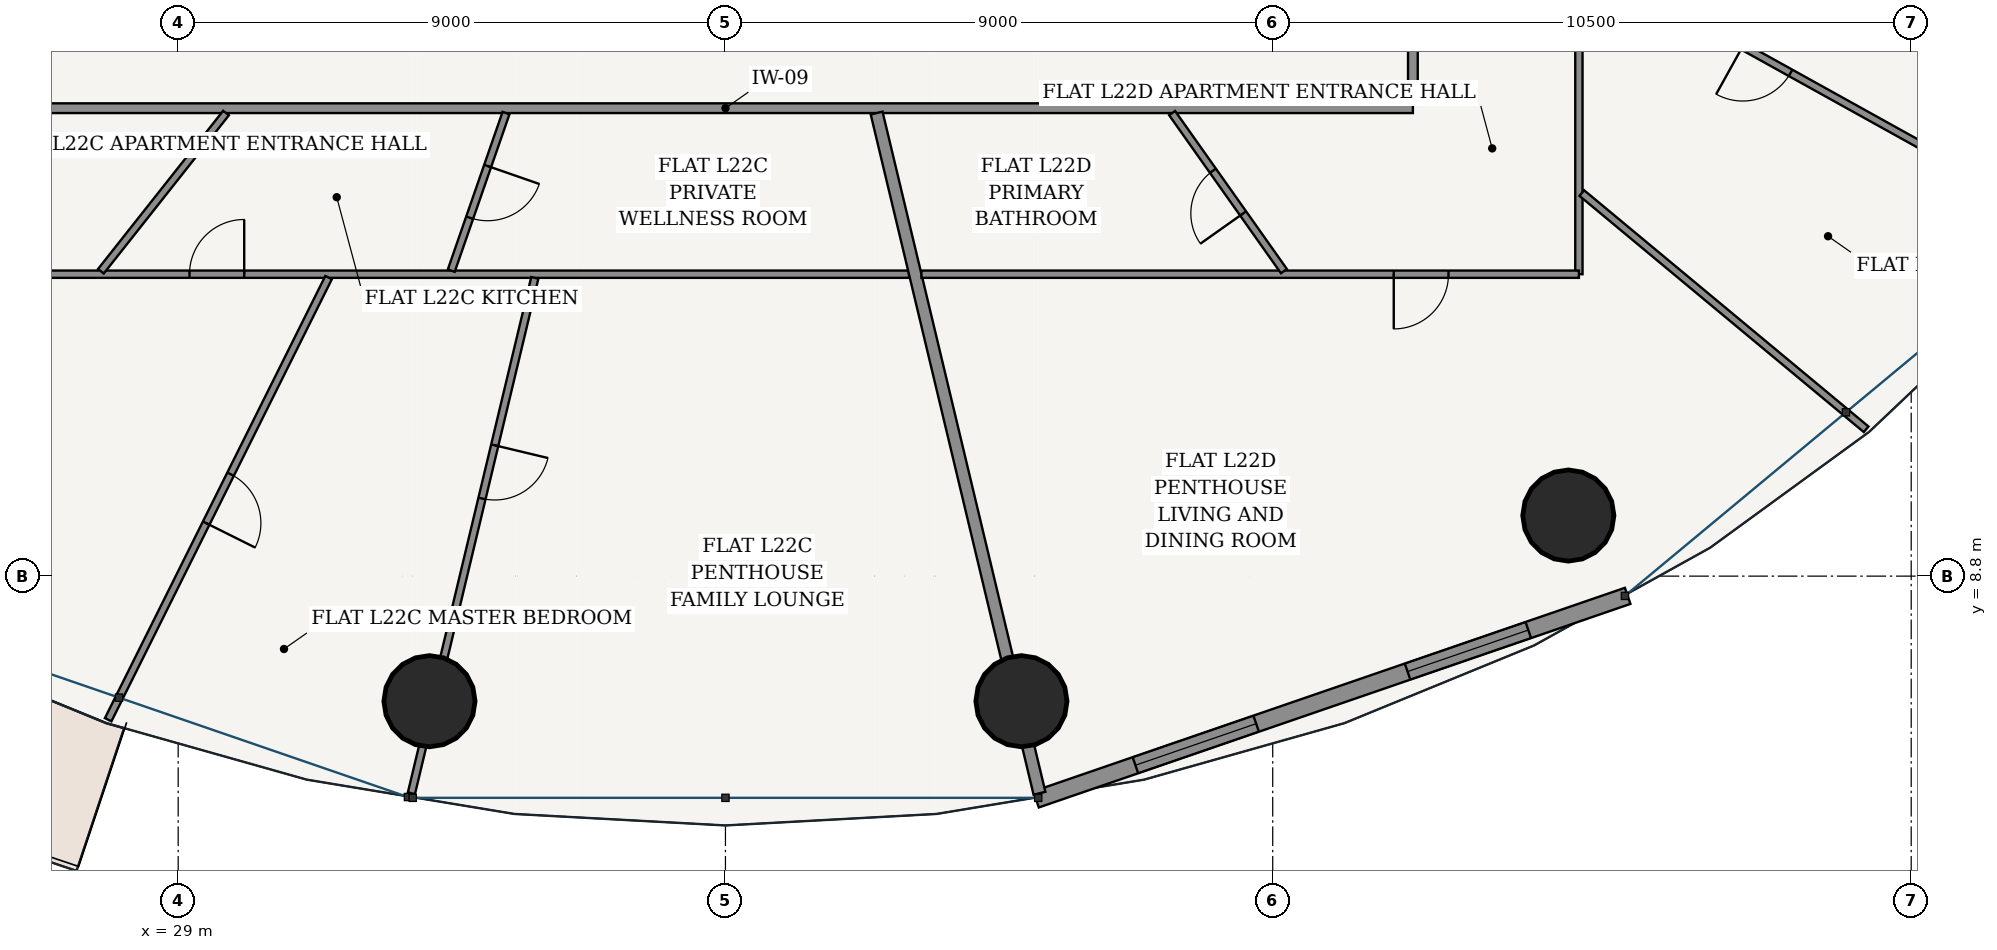
"""IFC4 building model, lengths in metres.
Left out: names, types, materials, properties, quantities, classifications, styles, units other than length and angle.
Written with IfcOpenShell. Run it as: python <this file> out.ifc"""

import sys

from ifc_helpers import new_model, si_unit, direction, frame, frame_2d, origin, origin_2d, place, context, subcontext, project, spatial, rectangle, hollow_circle, extrude, source, transform, mapped, element, fill, save


model = new_model("IFC4")
c1 = context("Model", 3, precision=1e-05, world=origin(), true_north=direction((-0.2419218956, 0.970295726276)))
c2 = subcontext(c1, "Body", "Model", "MODEL_VIEW")
j1 = project(units=[si_unit("LENGTHUNIT", "METRE"), si_unit("PLANEANGLEUNIT", "RADIAN")], contexts=[c1])
p1 = place(None, origin())
s1 = spatial("IfcSite", under=j1, at=p1, CompositionType="ELEMENT")
p2 = place(p1, origin())
s2 = spatial("IfcBuilding", under=s1, at=p2, CompositionType="ELEMENT")
p3 = place(p2, frame((0.0, 0.0, 87.0)))
s3 = spatial("IfcBuildingStorey", under=s2, at=p3, CompositionType="ELEMENT", Elevation=87.0)
for number, where, z_axis, x_axis in (
    (1, (33.133, 6.743, 0.0), (0.0, 0.0, 1.0), (1.0, 0.0, 0.0)),
    (2, (42.867, 6.743, 0.0), (0.0, 0.0, 1.0), (1.0, 0.0, 0.0)),
    (3, (51.862, 9.796, 0.0), (0.0, 0.0, 1.0), (1.0, 0.0, 0.0)),
):
    element("IfcColumn", number, at=place(p3, frame(where, z_axis=z_axis, x_axis=x_axis)), inside=s3, PredefinedType="COLUMN", context=c2, shape_type="SweptSolid", body=[
        extrude(hollow_circle(Radius=0.75, WallThickness=0.045, at=origin_2d()), origin(), (0.0, 0.0, 1.0), 3.6),
    ])
p4 = place(p3, frame((43.108, 5.128, 0.0), z_axis=(0.0, 0.0, 1.0), x_axis=(0.945590132341, 0.325360264351, 0.0)))
e4 = element("IfcWall", 4, at=p4, inside=s3, PredefinedType="SOLIDWALL", context=c2, shape_type="SweptSolid", body=[
    extrude(rectangle(XDim=10.289, YDim=0.28, at=frame_2d((5.145, 0.0))), origin(), (0.0, 0.0, 1.0), 3.325),
])
p5 = place(p4, frame((1.728, 0.0, 0.85)))
e5 = element("IfcOpeningElement", 5, at=p5, cuts=e4, PredefinedType="OPENING", context=c2, shape_type="SweptSolid", body=[
    extrude(rectangle(XDim=2.1, YDim=1.95, at=frame_2d((1.05, 0.975))), frame((0.0, 0.15, 0.0), z_axis=(0.0, -1.0, 0.0), x_axis=(1.0, 0.0, 0.0)), (0.0, 0.0, 1.0), 0.3),
])
p6 = place(p4, frame((6.461, 0.0, 0.85)))
e6 = element("IfcOpeningElement", 6, at=p6, cuts=e4, PredefinedType="OPENING", context=c2, shape_type="SweptSolid", body=[
    extrude(rectangle(XDim=2.1, YDim=1.95, at=frame_2d((1.05, 0.975))), frame((0.0, 0.15, 0.0), z_axis=(0.0, -1.0, 0.0), x_axis=(1.0, 0.0, 0.0)), (0.0, 0.0, 1.0), 0.3),
])
p7 = place(p3, frame((26.695, 16.495, 0.0), z_axis=(0.0, 0.0, 1.0), x_axis=(1.0, 0.0, 0.0)))
e7 = element("IfcWall", 7, at=p7, inside=s3, PredefinedType="PARTITIONING", context=c2, shape_type="SweptSolid", body=[
    extrude(rectangle(XDim=22.61, YDim=0.16, at=frame_2d((11.305, 0.0))), origin(), (0.0, 0.0, 1.0), 2.767),
])
p8 = place(p3, frame((49.305, 16.575, 0.0), z_axis=(0.0, 0.0, 1.0), x_axis=(0.0, 1.0, 0.0)))
e8 = element("IfcWall", 8, at=p8, inside=s3, PredefinedType="PARTITIONING", context=c2, shape_type="SweptSolid", body=[
    extrude(rectangle(XDim=20.45, YDim=0.16, at=frame_2d((10.225, 0.0))), origin(), (0.0, 0.0, 1.0), 2.767),
])
p9 = place(p8, frame((1.649, 0.0, 0.0)))
e9 = element("IfcOpeningElement", 9, at=p9, cuts=e8, PredefinedType="OPENING", context=c2, shape_type="SweptSolid", body=[
    extrude(rectangle(XDim=0.98, YDim=2.2, at=frame_2d((0.49, 1.1))), frame((0.0, 0.09, 0.0), z_axis=(0.0, -1.0, 0.0), x_axis=(1.0, 0.0, 0.0)), (0.0, 0.0, 1.0), 0.18),
])
p10 = place(p3, frame((41.019, 13.765, 0.0), z_axis=(0.0, 0.0, 1.0), x_axis=(-1.0, 0.0, 0.0)))
e10 = element("IfcWall", 10, at=p10, inside=s3, PredefinedType="PARTITIONING", context=c2, shape_type="SweptSolid", body=[
    extrude(rectangle(XDim=17.054, YDim=0.12, at=frame_2d((8.527, 0.0))), origin(), (0.0, 0.0, 1.0), 2.767),
])
p11 = place(p10, frame((10.933, 0.0, 0.0)))
e11 = element("IfcOpeningElement", 11, at=p11, cuts=e10, PredefinedType="OPENING", context=c2, shape_type="SweptSolid", body=[
    extrude(rectangle(XDim=0.9, YDim=2.15, at=frame_2d((0.45, 1.075))), frame((0.0, 0.07, 0.0), z_axis=(0.0, -1.0, 0.0), x_axis=(1.0, 0.0, 0.0)), (0.0, 0.0, 1.0), 0.14),
])
p12 = place(p3, frame((31.474, 13.709, 0.0), z_axis=(0.0, 0.0, 1.0), x_axis=(-0.446179583353, -0.894943450392, 0.0)))
e12 = element("IfcWall", 12, at=p12, inside=s3, PredefinedType="PARTITIONING", context=c2, shape_type="SweptSolid", body=[
    extrude(rectangle(XDim=8.125, YDim=0.12, at=frame_2d((4.062, 0.0))), origin(), (0.0, 0.0, 1.0), 2.767),
])
p13 = place(p12, frame((3.612, 0.0, 0.0)))
e13 = element("IfcOpeningElement", 13, at=p13, cuts=e12, PredefinedType="OPENING", context=c2, shape_type="SweptSolid", body=[
    extrude(rectangle(XDim=0.9, YDim=2.15, at=frame_2d((0.45, 1.075))), frame((0.0, 0.07, 0.0), z_axis=(0.0, -1.0, 0.0), x_axis=(1.0, 0.0, 0.0)), (0.0, 0.0, 1.0), 0.14),
])
p14 = place(p3, frame((34.865, 13.705, 0.0), z_axis=(0.0, 0.0, 1.0), x_axis=(-0.23282725047, -0.97251810854, 0.0)))
e14 = element("IfcWall", 14, at=p14, inside=s3, PredefinedType="PARTITIONING", context=c2, shape_type="SweptSolid", body=[
    extrude(rectangle(XDim=8.715, YDim=0.12, at=frame_2d((4.357, 0.0))), origin(), (0.0, 0.0, 1.0), 2.767),
])
p15 = place(p14, frame((2.831, 0.0, 0.0)))
e15 = element("IfcOpeningElement", 15, at=p15, cuts=e14, PredefinedType="OPENING", context=c2, shape_type="SweptSolid", body=[
    extrude(rectangle(XDim=0.9, YDim=2.15, at=frame_2d((0.45, 1.075))), frame((0.0, 0.07, 0.0), z_axis=(0.0, -1.0, 0.0), x_axis=(1.0, 0.0, 0.0)), (0.0, 0.0, 1.0), 0.14),
])
p16 = place(p3, frame((29.787, 16.415, 0.0), z_axis=(0.0, 0.0, 1.0), x_axis=(-0.62033143471, -0.784339793145, 0.0)))
e16 = element("IfcWall", 16, at=p16, inside=s3, PredefinedType="PARTITIONING", context=c2, shape_type="SweptSolid", body=[
    extrude(rectangle(XDim=3.317, YDim=0.12, at=frame_2d((1.658, 0.0))), origin(), (0.0, 0.0, 1.0), 3.004),
])
p17 = place(p3, frame((34.392, 16.415, 0.0), z_axis=(0.0, 0.0, 1.0), x_axis=(-0.328268661855, -0.94458439837, 0.0)))
e17 = element("IfcWall", 17, at=p17, inside=s3, PredefinedType="PARTITIONING", context=c2, shape_type="SweptSolid", body=[
    extrude(rectangle(XDim=2.744, YDim=0.12, at=frame_2d((1.372, 0.0))), origin(), (0.0, 0.0, 1.0), 3.325),
])
p18 = place(p17, frame((0.922, 0.0, 0.0)))
e18 = element("IfcOpeningElement", 18, at=p18, cuts=e17, PredefinedType="OPENING", context=c2, shape_type="SweptSolid", body=[
    extrude(rectangle(XDim=0.9, YDim=2.15, at=frame_2d((0.45, 1.075))), frame((0.0, 0.07, 0.0), z_axis=(0.0, -1.0, 0.0), x_axis=(1.0, 0.0, 0.0)), (0.0, 0.0, 1.0), 0.14),
])
p19 = place(p3, frame((40.486, 16.415, 0.0), z_axis=(0.0, 0.0, 1.0), x_axis=(0.232829417917, -0.972517589636, 0.0)))
e19 = element("IfcWall", 19, at=p19, inside=s3, PredefinedType="PARTITIONING", context=c2, shape_type="SweptSolid", body=[
    extrude(rectangle(XDim=11.502, YDim=0.2, at=frame_2d((5.751, 0.0))), origin(), (0.0, 0.0, 1.0), 2.767),
])
p20 = place(p3, frame((52.035, 29.017, 0.0), z_axis=(0.0, 0.0, 1.0), x_axis=(0.0, -1.0, 0.0)))
e20 = element("IfcWall", 20, at=p20, inside=s3, PredefinedType="PARTITIONING", context=c2, shape_type="SweptSolid", body=[
    extrude(rectangle(XDim=15.252, YDim=0.12, at=frame_2d((7.626, 0.0))), origin(), (0.0, 0.0, 1.0), 2.767),
])
p21 = place(p20, frame((7.278, 0.0, 0.0)))
e21 = element("IfcOpeningElement", 21, at=p21, cuts=e20, PredefinedType="OPENING", context=c2, shape_type="SweptSolid", body=[
    extrude(rectangle(XDim=0.9, YDim=2.15, at=frame_2d((0.45, 1.075))), frame((0.0, 0.07, 0.0), z_axis=(0.0, -1.0, 0.0), x_axis=(1.0, 0.0, 0.0)), (0.0, 0.0, 1.0), 0.14),
])
p22 = place(p3, frame((52.035, 13.765, 0.0), z_axis=(0.0, 0.0, 1.0), x_axis=(-1.0, 0.0, 0.0)))
e22 = element("IfcWall", 22, at=p22, inside=s3, PredefinedType="PARTITIONING", context=c2, shape_type="SweptSolid", body=[
    extrude(rectangle(XDim=10.812, YDim=0.12, at=frame_2d((5.406, 0.0))), origin(), (0.0, 0.0, 1.0), 2.767),
])
p23 = place(p22, frame((2.145, 0.0, 0.0)))
e23 = element("IfcOpeningElement", 23, at=p23, cuts=e22, PredefinedType="OPENING", context=c2, shape_type="SweptSolid", body=[
    extrude(rectangle(XDim=0.9, YDim=2.15, at=frame_2d((0.45, 1.075))), frame((0.0, 0.07, 0.0), z_axis=(0.0, -1.0, 0.0), x_axis=(1.0, 0.0, 0.0)), (0.0, 0.0, 1.0), 0.14),
])
p24 = place(p3, frame((52.083, 15.1, 0.0), z_axis=(0.0, 0.0, 1.0), x_axis=(0.769161827891, -0.63905405289, 0.0)))
e24 = element("IfcWall", 24, at=p24, inside=s3, PredefinedType="PARTITIONING", context=c2, shape_type="SweptSolid", body=[
    extrude(rectangle(XDim=6.08, YDim=0.12, at=frame_2d((3.04, 0.0))), origin(), (0.0, 0.0, 1.0), 2.767),
])
p25 = place(p3, frame((52.089, 18.979, 0.0), z_axis=(0.0, 0.0, 1.0), x_axis=(0.874313476423, -0.485361664066, 0.0)))
e25 = element("IfcWall", 25, at=p25, inside=s3, PredefinedType="PARTITIONING", context=c2, shape_type="SweptSolid", body=[
    extrude(rectangle(XDim=9.066, YDim=0.12, at=frame_2d((4.533, 0.0))), origin(), (0.0, 0.0, 1.0), 2.767),
])
p26 = place(p25, frame((3.02, 0.0, 0.0)))
e26 = element("IfcOpeningElement", 26, at=p26, cuts=e25, PredefinedType="OPENING", context=c2, shape_type="SweptSolid", body=[
    extrude(rectangle(XDim=0.9, YDim=2.15, at=frame_2d((0.45, 1.075))), frame((0.0, 0.07, 0.0), z_axis=(0.0, -1.0, 0.0), x_axis=(1.0, 0.0, 0.0)), (0.0, 0.0, 1.0), 0.14),
])
p27 = place(p3, frame((45.345, 16.415, 0.0), z_axis=(0.0, 0.0, 1.0), x_axis=(0.577474693199, -0.816408585645, 0.0)))
e27 = element("IfcWall", 27, at=p27, inside=s3, PredefinedType="PARTITIONING", context=c2, shape_type="SweptSolid", body=[
    extrude(rectangle(XDim=3.184, YDim=0.12, at=frame_2d((1.592, 0.0))), origin(), (0.0, 0.0, 1.0), 3.004),
])
p28 = place(p27, frame((1.162, 0.0, 0.0)))
e28 = element("IfcOpeningElement", 28, at=p28, cuts=e27, PredefinedType="OPENING", context=c2, shape_type="SweptSolid", body=[
    extrude(rectangle(XDim=0.86, YDim=2.15, at=frame_2d((0.43, 1.075))), frame((0.0, 0.07, 0.0), z_axis=(0.0, -1.0, 0.0), x_axis=(1.0, 0.0, 0.0)), (0.0, 0.0, 1.0), 0.14),
])
m1 = source(origin(), c2, "Body", "SweptSolid", [
    extrude(rectangle(XDim=2.1, YDim=1.95, at=frame_2d((1.05, 0.975))), frame((0.0, 0.03, 0.0), z_axis=(0.0, -1.0, 0.0), x_axis=(1.0, 0.0, 0.0)), (0.0, 0.0, 1.0), 0.06),
])
p29 = place(p5, origin())
e29 = element("IfcWindow", 29, at=p29, inside=s3, PartitioningType="SINGLE_PANEL", PredefinedType="WINDOW", context=c2, shape_type="MappedRepresentation", body=[
    mapped(m1, transform((0.0, 0.0, 0.0), scale=1.0)),
])
fill(e5, e29)
p30 = place(p6, origin())
e30 = element("IfcWindow", 30, at=p30, inside=s3, PartitioningType="SINGLE_PANEL", PredefinedType="WINDOW", context=c2, shape_type="MappedRepresentation", body=[
    mapped(m1, transform((0.0, 0.0, 0.0), scale=1.0)),
])
fill(e6, e30)
m2 = source(origin(), c2, "Body", "SweptSolid", [
    extrude(rectangle(XDim=0.9, YDim=2.15, at=frame_2d((0.45, 1.075))), frame((0.0, 0.025, 0.0), z_axis=(0.0, -1.0, 0.0), x_axis=(1.0, 0.0, 0.0)), (0.0, 0.0, 1.0), 0.05),
])
p31 = place(p11, frame((0.9, 0.0, 0.0), z_axis=(0.0, 0.0, 1.0), x_axis=(-1.0, 0.0, 0.0)))
e31 = element("IfcDoor", 31, at=p31, inside=s3, OperationType="SINGLE_SWING_RIGHT", PredefinedType="DOOR", context=c2, shape_type="MappedRepresentation", body=[
    mapped(m2, transform((0.0, 0.0, 0.0), scale=1.0)),
])
fill(e11, e31)
p32 = place(p18, origin())
e32 = element("IfcDoor", 32, at=p32, inside=s3, OperationType="SINGLE_SWING_LEFT", PredefinedType="DOOR", context=c2, shape_type="MappedRepresentation", body=[
    mapped(m2, transform((0.0, 0.0, 0.0), scale=1.0)),
])
fill(e18, e32)
p33 = place(p13, origin())
e33 = element("IfcDoor", 33, at=p33, inside=s3, OperationType="SINGLE_SWING_RIGHT", PredefinedType="DOOR", context=c2, shape_type="MappedRepresentation", body=[
    mapped(m2, transform((0.0, 0.0, 0.0), scale=1.0)),
])
fill(e13, e33)
p34 = place(p15, origin())
e34 = element("IfcDoor", 34, at=p34, inside=s3, OperationType="SINGLE_SWING_LEFT", PredefinedType="DOOR", context=c2, shape_type="MappedRepresentation", body=[
    mapped(m2, transform((0.0, 0.0, 0.0), scale=1.0)),
])
fill(e15, e34)
m3 = source(origin(), c2, "Body", "SweptSolid", [
    extrude(rectangle(XDim=0.86, YDim=2.15, at=frame_2d((0.43, 1.075))), frame((0.0, 0.025, 0.0), z_axis=(0.0, -1.0, 0.0), x_axis=(1.0, 0.0, 0.0)), (0.0, 0.0, 1.0), 0.05),
])
p35 = place(p28, frame((0.86, 0.0, 0.0), z_axis=(0.0, 0.0, 1.0), x_axis=(-1.0, 0.0, 0.0)))
e35 = element("IfcDoor", 35, at=p35, inside=s3, OperationType="SINGLE_SWING_LEFT", PredefinedType="DOOR", context=c2, shape_type="MappedRepresentation", body=[
    mapped(m3, transform((0.0, 0.0, 0.0), scale=1.0)),
])
fill(e28, e35)
p36 = place(p23, origin())
e36 = element("IfcDoor", 36, at=p36, inside=s3, OperationType="SINGLE_SWING_RIGHT", PredefinedType="DOOR", context=c2, shape_type="MappedRepresentation", body=[
    mapped(m2, transform((0.0, 0.0, 0.0), scale=1.0)),
])
fill(e23, e36)
p37 = place(p26, frame((0.9, 0.0, 0.0), z_axis=(0.0, 0.0, 1.0), x_axis=(-1.0, 0.0, 0.0)))
e37 = element("IfcDoor", 37, at=p37, inside=s3, OperationType="SINGLE_SWING_RIGHT", PredefinedType="DOOR", context=c2, shape_type="MappedRepresentation", body=[
    mapped(m2, transform((0.0, 0.0, 0.0), scale=1.0)),
])
fill(e26, e37)
save(model, sys.argv[1])
